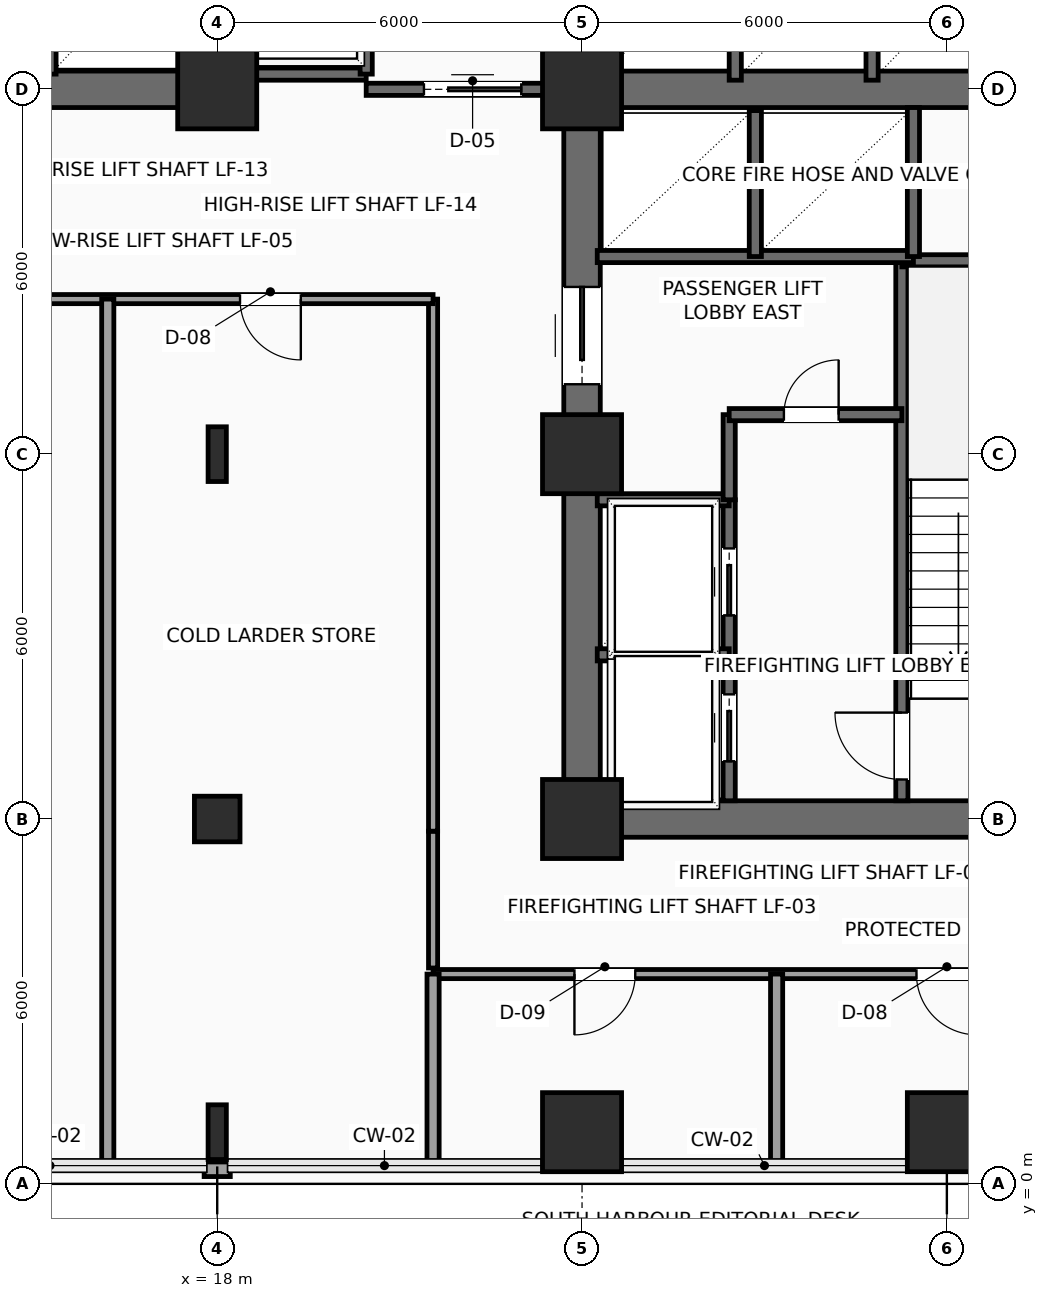
"""IFC4 building model, lengths in metres.
Left out: names, types, materials, properties, quantities, classifications, styles, units other than length and angle.
Written with IfcOpenShell. Run it as: python <this file> out.ifc"""

import sys

from ifc_helpers import new_model, si_unit, direction, frame, frame_2d, origin, origin_2d, place, context, subcontext, project, spatial, rectangle, hollow_rectangle, i_section, extrude, element, fill, save


model = new_model("IFC4")
c1 = context("Model", 3, precision=1e-05, world=origin(), true_north=direction((0.0, 1.0)))
c2 = subcontext(c1, "Body", "Model", "MODEL_VIEW")
j1 = project(units=[si_unit("LENGTHUNIT", "METRE"), si_unit("PLANEANGLEUNIT", "RADIAN")], contexts=[c1])
p1 = place(None, origin())
s1 = spatial("IfcSite", under=j1, at=p1, CompositionType="ELEMENT")
p2 = place(p1, origin())
s2 = spatial("IfcBuilding", under=s1, at=p2, CompositionType="ELEMENT")
p3 = place(p2, frame((0.0, 0.0, 71.4)))
s3 = spatial("IfcBuildingStorey", under=s2, at=p3, CompositionType="ELEMENT", Elevation=71.4)
for number, where, z_axis, x_axis in (
    (1, (18.0, 18.0, 0.0), (0.0, 0.0, 1.0), (1.0, 0.0, 0.0)),
    (2, (24.0, 6.0, 0.0), (0.0, 0.0, 1.0), (1.0, 0.0, 0.0)),
    (3, (24.0, 12.0, 0.0), (0.0, 0.0, 1.0), (1.0, 0.0, 0.0)),
    (4, (24.0, 18.0, 0.0), (0.0, 0.0, 1.0), (1.0, 0.0, 0.0)),
):
    element("IfcColumn", number, at=place(p3, frame(where, z_axis=z_axis, x_axis=x_axis)), inside=s3, PredefinedType="COLUMN", context=c2, shape_type="SweptSolid", body=[
        extrude(rectangle(XDim=1.3, YDim=1.3, at=origin_2d()), origin(), (0.0, 0.0, 1.0), 3.9),
    ])
p4 = place(p3, frame((18.0, 0.85, 0.0), z_axis=(0.0, 0.0, 1.0), x_axis=(1.0, 0.0, 0.0)))
e5 = element("IfcColumn", 5, at=p4, inside=s3, PredefinedType="COLUMN", context=c2, shape_type="SweptSolid", body=[
    extrude(i_section(OverallWidth=0.3, OverallDepth=0.9, WebThickness=0.019, FlangeThickness=0.035, FilletRadius=0.03, at=origin_2d()), origin(), (0.0, 0.0, 1.0), 3.9),
])
p5 = place(p3, frame((18.0, 6.0, 0.0), z_axis=(0.0, 0.0, 1.0), x_axis=(1.0, 0.0, 0.0)))
e6 = element("IfcColumn", 6, at=p5, inside=s3, PredefinedType="COLUMN", context=c2, shape_type="SweptSolid", body=[
    extrude(hollow_rectangle(XDim=0.75, YDim=0.75, WallThickness=0.035, InnerFilletRadius=0.035, OuterFilletRadius=0.05, at=origin_2d()), origin(), (0.0, 0.0, 1.0), 3.9),
])
p6 = place(p3, frame((18.0, 12.0, 0.0), z_axis=(0.0, 0.0, 1.0), x_axis=(1.0, 0.0, 0.0)))
e7 = element("IfcColumn", 7, at=p6, inside=s3, PredefinedType="COLUMN", context=c2, shape_type="SweptSolid", body=[
    extrude(i_section(OverallWidth=0.3, OverallDepth=0.9, WebThickness=0.019, FlangeThickness=0.035, FilletRadius=0.03, at=origin_2d()), origin(), (0.0, 0.0, 1.0), 3.9),
])
for number, where, z_axis, x_axis in (
    (8, (24.0, 0.85, 0.0), (0.0, 0.0, 1.0), (1.0, 0.0, 0.0)),
    (9, (30.0, 0.85, 0.0), (0.0, 0.0, 1.0), (1.0, 0.0, 0.0)),
):
    element("IfcColumn", number, at=place(p3, frame(where, z_axis=z_axis, x_axis=x_axis)), inside=s3, PredefinedType="COLUMN", context=c2, shape_type="SweptSolid", body=[
        extrude(rectangle(XDim=1.3, YDim=1.3, at=origin_2d()), origin(), (0.0, 0.0, 1.0), 3.9),
    ])
p7 = place(p3, frame((18.215, 0.24, 0.0), z_axis=(0.0, 0.0, 1.0), x_axis=(-1.0, 0.0, 0.0)))
e10 = element("IfcWall", 10, at=p7, inside=s3, PredefinedType="SOLIDWALL", context=c2, shape_type="SweptSolid", body=[
    extrude(rectangle(XDim=0.43, YDim=0.24, at=frame_2d((0.215, 0.0))), origin(), (0.0, 0.0, 1.0), 3.65),
])
p8 = place(p3, frame((6.0, 18.0, 0.0), z_axis=(0.0, 0.0, 1.0), x_axis=(1.0, 0.0, 0.0)))
e11 = element("IfcWall", 11, at=p8, inside=s3, PredefinedType="SHEAR", context=c2, shape_type="SweptSolid", body=[
    extrude(rectangle(XDim=12.0, YDim=0.6, at=frame_2d((6.0, 0.0))), origin(), (0.0, 0.0, 1.0), 3.65),
])
p9 = place(p8, frame((7.15, 0.0, 0.0)))
e12 = element("IfcOpeningElement", 12, at=p9, cuts=e11, PredefinedType="OPENING", context=c2, shape_type="SweptSolid", body=[
    extrude(rectangle(XDim=1.6, YDim=2.3, at=frame_2d((0.8, 1.15))), frame((0.0, 0.31, 0.0), z_axis=(0.0, -1.0, 0.0), x_axis=(1.0, 0.0, 0.0)), (0.0, 0.0, 1.0), 0.62),
])
for number, where, z_axis, x_axis in (
    (13, (18.0, 18.0, 0.0), (0.0, 0.0, 1.0), (0.0, 1.0, 0.0)),
    (14, (24.0, 6.0, 0.0), (0.0, 0.0, 1.0), (1.0, 0.0, 0.0)),
    (15, (24.0, 18.0, 0.0), (0.0, 0.0, 1.0), (1.0, 0.0, 0.0)),
):
    element("IfcWall", number, at=place(p3, frame(where, z_axis=z_axis, x_axis=x_axis)), inside=s3, PredefinedType="SHEAR", context=c2, shape_type="SweptSolid", body=[
        extrude(rectangle(XDim=9.6, YDim=0.6, at=frame_2d((4.8, 0.0))), origin(), (0.0, 0.0, 1.0), 3.65),
    ])
p10 = place(p3, frame((24.0, 6.0, 0.0), z_axis=(0.0, 0.0, 1.0), x_axis=(0.0, 1.0, 0.0)))
e16 = element("IfcWall", 16, at=p10, inside=s3, PredefinedType="SHEAR", context=c2, shape_type="SweptSolid", body=[
    extrude(rectangle(XDim=12.0, YDim=0.6, at=frame_2d((6.0, 0.0))), origin(), (0.0, 0.0, 1.0), 3.65),
])
p11 = place(p10, frame((7.15, 0.0, 0.0)))
e17 = element("IfcOpeningElement", 17, at=p11, cuts=e16, PredefinedType="OPENING", context=c2, shape_type="SweptSolid", body=[
    extrude(rectangle(XDim=1.6, YDim=2.3, at=frame_2d((0.8, 1.15))), frame((0.0, 0.31, 0.0), z_axis=(0.0, -1.0, 0.0), x_axis=(1.0, 0.0, 0.0)), (0.0, 0.0, 1.0), 0.62),
])
p12 = place(p3, frame((29.26, 6.3, 0.0), z_axis=(0.0, 0.0, 1.0), x_axis=(0.0, 1.0, 0.0)))
e18 = element("IfcWall", 18, at=p12, inside=s3, PredefinedType="SHEAR", context=c2, shape_type="SweptSolid", body=[
    extrude(rectangle(XDim=8.88, YDim=0.2, at=frame_2d((4.44, 0.0))), origin(), (0.0, 0.0, 1.0), 3.65),
])
p13 = place(p12, frame((0.35, 0.0, 0.0)))
e19 = element("IfcOpeningElement", 19, at=p13, cuts=e18, PredefinedType="OPENING", context=c2, shape_type="SweptSolid", body=[
    extrude(rectangle(XDim=1.1, YDim=2.2, at=frame_2d((0.55, 1.1))), frame((0.0, 0.11, 0.0), z_axis=(0.0, -1.0, 0.0), x_axis=(1.0, 0.0, 0.0)), (0.0, 0.0, 1.0), 0.22),
])
p14 = place(p3, frame((29.26, 15.18, 0.0), z_axis=(0.0, 0.0, 1.0), x_axis=(1.0, 0.0, 0.0)))
e20 = element("IfcWall", 20, at=p14, inside=s3, PredefinedType="SHEAR", context=c2, shape_type="SweptSolid", body=[
    extrude(rectangle(XDim=4.04, YDim=0.2, at=frame_2d((2.02, 0.0))), origin(), (0.0, 0.0, 1.0), 3.65),
])
p15 = place(p3, frame((26.42, 6.3, 0.0), z_axis=(0.0, 0.0, 1.0), x_axis=(0.0, 1.0, 0.0)))
e21 = element("IfcWall", 21, at=p15, inside=s3, PredefinedType="SHEAR", context=c2, shape_type="SweptSolid", body=[
    extrude(rectangle(XDim=4.95, YDim=0.2, at=frame_2d((2.475, 0.0))), origin(), (0.0, 0.0, 1.0), 3.65),
])
p16 = place(p15, frame((0.65, 0.0, 0.0)))
e22 = element("IfcOpeningElement", 22, at=p16, cuts=e21, PredefinedType="OPENING", context=c2, shape_type="SweptSolid", body=[
    extrude(rectangle(XDim=1.1, YDim=2.2, at=frame_2d((0.55, 1.1))), frame((0.0, 0.11, 0.0), z_axis=(0.0, -1.0, 0.0), x_axis=(1.0, 0.0, 0.0)), (0.0, 0.0, 1.0), 0.22),
])
p17 = place(p15, frame((3.05, 0.0, 0.0)))
e23 = element("IfcOpeningElement", 23, at=p17, cuts=e21, PredefinedType="OPENING", context=c2, shape_type="SweptSolid", body=[
    extrude(rectangle(XDim=1.1, YDim=2.2, at=frame_2d((0.55, 1.1))), frame((0.0, 0.11, 0.0), z_axis=(0.0, -1.0, 0.0), x_axis=(1.0, 0.0, 0.0)), (0.0, 0.0, 1.0), 0.22),
])
for number, where, z_axis, x_axis in (
    (24, (24.25, 8.7, 0.0), (0.0, 0.0, 1.0), (1.0, 0.0, 0.0)),
    (25, (24.25, 11.25, 0.0), (0.0, 0.0, 1.0), (1.0, 0.0, 0.0)),
):
    element("IfcWall", number, at=place(p3, frame(where, z_axis=z_axis, x_axis=x_axis)), inside=s3, PredefinedType="SHEAR", context=c2, shape_type="SweptSolid", body=[
        extrude(rectangle(XDim=2.17, YDim=0.2, at=frame_2d((1.085, 0.0))), origin(), (0.0, 0.0, 1.0), 3.65),
    ])
p18 = place(p3, frame((26.42, 11.25, 0.0), z_axis=(0.0, 0.0, 1.0), x_axis=(0.0, 1.0, 0.0)))
e26 = element("IfcWall", 26, at=p18, inside=s3, PredefinedType="SHEAR", context=c2, shape_type="SweptSolid", body=[
    extrude(rectangle(XDim=1.4, YDim=0.2, at=frame_2d((0.7, 0.0))), origin(), (0.0, 0.0, 1.0), 3.65),
])
p19 = place(p3, frame((26.42, 12.65, 0.0), z_axis=(0.0, 0.0, 1.0), x_axis=(1.0, 0.0, 0.0)))
e27 = element("IfcWall", 27, at=p19, inside=s3, PredefinedType="SHEAR", context=c2, shape_type="SweptSolid", body=[
    extrude(rectangle(XDim=2.84, YDim=0.2, at=frame_2d((1.42, 0.0))), origin(), (0.0, 0.0, 1.0), 3.65),
])
p20 = place(p19, frame((0.9, 0.0, 0.0)))
e28 = element("IfcOpeningElement", 28, at=p20, cuts=e27, PredefinedType="OPENING", context=c2, shape_type="SweptSolid", body=[
    extrude(rectangle(XDim=0.9, YDim=2.15, at=frame_2d((0.45, 1.075))), frame((0.0, 0.11, 0.0), z_axis=(0.0, -1.0, 0.0), x_axis=(1.0, 0.0, 0.0)), (0.0, 0.0, 1.0), 0.22),
])
for number, where, z_axis, x_axis in (
    (29, (15.25, 18.25, 0.0), (0.0, 0.0, 1.0), (0.0, 1.0, 0.0)),
    (30, (24.25, 15.25, 0.0), (0.0, 0.0, 1.0), (1.0, 0.0, 0.0)),
):
    element("IfcWall", number, at=place(p3, frame(where, z_axis=z_axis, x_axis=x_axis)), inside=s3, PredefinedType="SHEAR", context=c2, shape_type="SweptSolid", body=[
        extrude(rectangle(XDim=5.2, YDim=0.2, at=frame_2d((2.6, 0.0))), origin(), (0.0, 0.0, 1.0), 3.65),
    ])
p21 = place(p3, frame((26.85, 15.25, 0.0), z_axis=(0.0, 0.0, 1.0), x_axis=(0.0, 1.0, 0.0)))
e31 = element("IfcWall", 31, at=p21, inside=s3, PredefinedType="SHEAR", context=c2, shape_type="SweptSolid", body=[
    extrude(rectangle(XDim=2.4, YDim=0.2, at=frame_2d((1.2, 0.0))), origin(), (0.0, 0.0, 1.0), 3.65),
])
p22 = place(p3, frame((29.45, 15.25, 0.0), z_axis=(0.0, 0.0, 1.0), x_axis=(0.0, 1.0, 0.0)))
e32 = element("IfcWall", 32, at=p22, inside=s3, PredefinedType="SHEAR", context=c2, shape_type="SweptSolid", body=[
    extrude(rectangle(XDim=2.45, YDim=0.2, at=frame_2d((1.225, 0.0))), origin(), (0.0, 0.0, 1.0), 3.65),
])
p23 = place(p3, frame((18.1, 18.25, 0.0), z_axis=(0.0, 0.0, 1.0), x_axis=(1.0, 0.0, 0.0)))
e33 = element("IfcWall", 33, at=p23, inside=s3, PredefinedType="SHEAR", context=c2, shape_type="SweptSolid", body=[
    extrude(rectangle(XDim=2.35, YDim=0.2, at=frame_2d((1.175, 0.0))), origin(), (0.0, 0.0, 1.0), 3.65),
])
p24 = place(p3, frame((20.45, 18.25, 0.0), z_axis=(0.0, 0.0, 1.0), x_axis=(0.0, 1.0, 0.0)))
e34 = element("IfcWall", 34, at=p24, inside=s3, PredefinedType="SHEAR", context=c2, shape_type="SweptSolid", body=[
    extrude(rectangle(XDim=9.05, YDim=0.2, at=frame_2d((4.525, 0.0))), origin(), (0.0, 0.0, 1.0), 3.65),
])
p25 = place(p24, frame((0.4, 0.0, 0.0)))
e35 = element("IfcOpeningElement", 35, at=p25, cuts=e34, PredefinedType="OPENING", context=c2, shape_type="SweptSolid", body=[
    extrude(rectangle(XDim=1.2, YDim=2.2, at=frame_2d((0.6, 1.1))), frame((0.0, 0.11, 0.0), z_axis=(0.0, -1.0, 0.0), x_axis=(1.0, 0.0, 0.0)), (0.0, 0.0, 1.0), 0.22),
])
p26 = place(p24, frame((2.65, 0.0, 0.0)))
e36 = element("IfcOpeningElement", 36, at=p26, cuts=e34, PredefinedType="OPENING", context=c2, shape_type="SweptSolid", body=[
    extrude(rectangle(XDim=1.2, YDim=2.2, at=frame_2d((0.6, 1.1))), frame((0.0, 0.11, 0.0), z_axis=(0.0, -1.0, 0.0), x_axis=(1.0, 0.0, 0.0)), (0.0, 0.0, 1.0), 0.22),
])
p27 = place(p24, frame((4.9, 0.0, 0.0)))
e37 = element("IfcOpeningElement", 37, at=p27, cuts=e34, PredefinedType="OPENING", context=c2, shape_type="SweptSolid", body=[
    extrude(rectangle(XDim=1.2, YDim=2.2, at=frame_2d((0.6, 1.1))), frame((0.0, 0.11, 0.0), z_axis=(0.0, -1.0, 0.0), x_axis=(1.0, 0.0, 0.0)), (0.0, 0.0, 1.0), 0.22),
])
p28 = place(p24, frame((7.15, 0.0, 0.0)))
e38 = element("IfcOpeningElement", 38, at=p28, cuts=e34, PredefinedType="OPENING", context=c2, shape_type="SweptSolid", body=[
    extrude(rectangle(XDim=1.2, YDim=2.2, at=frame_2d((0.6, 1.1))), frame((0.0, 0.11, 0.0), z_axis=(0.0, -1.0, 0.0), x_axis=(1.0, 0.0, 0.0)), (0.0, 0.0, 1.0), 0.22),
])
p29 = place(p3, frame((20.45, 18.0, 0.0), z_axis=(0.0, 0.0, 1.0), x_axis=(1.0, 0.0, 0.0)))
e39 = element("IfcWall", 39, at=p29, inside=s3, PredefinedType="SHEAR", context=c2, shape_type="SweptSolid", body=[
    extrude(rectangle(XDim=3.5, YDim=0.2, at=frame_2d((1.75, 0.0))), origin(), (0.0, 0.0, 1.0), 3.65),
])
p30 = place(p29, frame((0.95, 0.0, 0.0)))
e40 = element("IfcOpeningElement", 40, at=p30, cuts=e39, PredefinedType="OPENING", context=c2, shape_type="SweptSolid", body=[
    extrude(rectangle(XDim=1.6, YDim=2.3, at=frame_2d((0.8, 1.15))), frame((0.0, 0.11, 0.0), z_axis=(0.0, -1.0, 0.0), x_axis=(1.0, 0.0, 0.0)), (0.0, 0.0, 1.0), 0.22),
])
p31 = place(p3, frame((23.95, 18.0, 0.0), z_axis=(0.0, 0.0, 1.0), x_axis=(0.0, 1.0, 0.0)))
e41 = element("IfcWall", 41, at=p31, inside=s3, PredefinedType="SHEAR", context=c2, shape_type="SweptSolid", body=[
    extrude(rectangle(XDim=9.3, YDim=0.2, at=frame_2d((4.65, 0.0))), origin(), (0.0, 0.0, 1.0), 3.65),
])
p32 = place(p3, frame((24.25, 18.1, 0.0), z_axis=(0.0, 0.0, 1.0), x_axis=(0.0, 1.0, 0.0)))
e42 = element("IfcWall", 42, at=p32, inside=s3, PredefinedType="SHEAR", context=c2, shape_type="SweptSolid", body=[
    extrude(rectangle(XDim=2.35, YDim=0.2, at=frame_2d((1.175, 0.0))), origin(), (0.0, 0.0, 1.0), 3.65),
])
for number, where, z_axis, x_axis in (
    (43, (26.52, 18.15, 0.0), (0.0, 0.0, 1.0), (0.0, 1.0, 0.0)),
    (44, (28.77, 18.15, 0.0), (0.0, 0.0, 1.0), (0.0, 1.0, 0.0)),
):
    element("IfcWall", number, at=place(p3, frame(where, z_axis=z_axis, x_axis=x_axis)), inside=s3, PredefinedType="SHEAR", context=c2, shape_type="SweptSolid", body=[
        extrude(rectangle(XDim=2.3, YDim=0.2, at=frame_2d((1.15, 0.0))), origin(), (0.0, 0.0, 1.0), 3.65),
    ])
p33 = place(p3, frame((36.15, 3.45, 0.0), z_axis=(0.0, 0.0, 1.0), x_axis=(-1.0, 0.0, 0.0)))
e45 = element("IfcWall", 45, at=p33, inside=s3, PredefinedType="PARTITIONING", context=c2, shape_type="SweptSolid", body=[
    extrude(rectangle(XDim=14.6, YDim=0.15, at=frame_2d((7.3, 0.0))), origin(), (0.0, 0.0, 1.0), 3.142),
])
p34 = place(p33, frame((11.275, 0.0, 0.0)))
e46 = element("IfcOpeningElement", 46, at=p34, cuts=e45, PredefinedType="OPENING", context=c2, shape_type="SweptSolid", body=[
    extrude(rectangle(XDim=1.0, YDim=2.2, at=frame_2d((0.5, 1.1))), frame((0.0, 0.085, 0.0), z_axis=(0.0, -1.0, 0.0), x_axis=(1.0, 0.0, 0.0)), (0.0, 0.0, 1.0), 0.17),
])
p35 = place(p33, frame((5.65, 0.0, 0.0)))
e47 = element("IfcOpeningElement", 47, at=p35, cuts=e45, PredefinedType="OPENING", context=c2, shape_type="SweptSolid", body=[
    extrude(rectangle(XDim=1.0, YDim=2.2, at=frame_2d((0.5, 1.1))), frame((0.0, 0.085, 0.0), z_axis=(0.0, -1.0, 0.0), x_axis=(1.0, 0.0, 0.0)), (0.0, 0.0, 1.0), 0.17),
])
p36 = place(p3, frame((21.55, 3.55, 0.0), z_axis=(0.0, 0.0, 1.0), x_axis=(0.0, 1.0, 0.0)))
e48 = element("IfcWall", 48, at=p36, inside=s3, PredefinedType="PARTITIONING", context=c2, shape_type="SweptSolid", body=[
    extrude(rectangle(XDim=2.25, YDim=0.15, at=frame_2d((1.125, 0.0))), origin(), (0.0, 0.0, 1.0), 3.65),
])
p37 = place(p3, frame((21.55, 5.8, 0.0), z_axis=(0.0, 0.0, 1.0), x_axis=(0.0, 1.0, 0.0)))
e49 = element("IfcWall", 49, at=p37, inside=s3, PredefinedType="PARTITIONING", context=c2, shape_type="SweptSolid", body=[
    extrude(rectangle(XDim=8.75, YDim=0.15, at=frame_2d((4.375, 0.0))), origin(), (0.0, 0.0, 1.0), 3.65),
])
p38 = place(p3, frame((21.55, 14.55, 0.0), z_axis=(0.0, 0.0, 1.0), x_axis=(-1.0, 0.0, 0.0)))
e50 = element("IfcWall", 50, at=p38, inside=s3, PredefinedType="PARTITIONING", context=c2, shape_type="SweptSolid", body=[
    extrude(rectangle(XDim=8.95, YDim=0.15, at=frame_2d((4.475, 0.0))), origin(), (0.0, 0.0, 1.0), 3.65),
])
p39 = place(p38, frame((6.65, 0.0, 0.0)))
e51 = element("IfcOpeningElement", 51, at=p39, cuts=e50, PredefinedType="OPENING", context=c2, shape_type="SweptSolid", body=[
    extrude(rectangle(XDim=1.0, YDim=2.2, at=frame_2d((0.5, 1.1))), frame((0.0, 0.085, 0.0), z_axis=(0.0, -1.0, 0.0), x_axis=(1.0, 0.0, 0.0)), (0.0, 0.0, 1.0), 0.17),
])
p40 = place(p38, frame((2.175, 0.0, 0.0)))
e52 = element("IfcOpeningElement", 52, at=p40, cuts=e50, PredefinedType="OPENING", context=c2, shape_type="SweptSolid", body=[
    extrude(rectangle(XDim=1.0, YDim=2.2, at=frame_2d((0.5, 1.1))), frame((0.0, 0.085, 0.0), z_axis=(0.0, -1.0, 0.0), x_axis=(1.0, 0.0, 0.0)), (0.0, 0.0, 1.0), 0.17),
])
p41 = place(p3, frame((16.2, 0.3, 0.0), z_axis=(0.0, 0.0, 1.0), x_axis=(0.0, 1.0, 0.0)))
e53 = element("IfcWall", 53, at=p41, inside=s3, PredefinedType="PARTITIONING", context=c2, shape_type="SweptSolid", body=[
    extrude(rectangle(XDim=14.25, YDim=0.2, at=frame_2d((7.125, 0.0))), origin(), (0.0, 0.0, 1.0), 3.65),
])
for number, where, z_axis, x_axis in (
    (54, (21.55, 0.3, 0.0), (0.0, 0.0, 1.0), (0.0, 1.0, 0.0)),
    (55, (27.2, 0.3, 0.0), (0.0, 0.0, 1.0), (0.0, 1.0, 0.0)),
):
    element("IfcWall", number, at=place(p3, frame(where, z_axis=z_axis, x_axis=x_axis)), inside=s3, PredefinedType="PARTITIONING", context=c2, shape_type="SweptSolid", body=[
        extrude(rectangle(XDim=3.15, YDim=0.2, at=frame_2d((1.575, 0.0))), origin(), (0.0, 0.0, 1.0), 3.65),
    ])
p42 = place(p11, origin())
e56 = element("IfcDoor", 56, at=p42, inside=s3, OperationType="DOUBLE_DOOR_SLIDING", PredefinedType="DOOR", context=c2, shape_type="SweptSolid", body=[
    extrude(rectangle(XDim=1.6, YDim=2.3, at=frame_2d((0.8, 1.15))), frame((0.0, 0.025, 0.0), z_axis=(0.0, -1.0, 0.0), x_axis=(1.0, 0.0, 0.0)), (0.0, 0.0, 1.0), 0.05),
])
fill(e17, e56)
p43 = place(p13, origin())
e57 = element("IfcDoor", 57, at=p43, inside=s3, OperationType="SINGLE_SWING_RIGHT", PredefinedType="DOOR", context=c2, shape_type="SweptSolid", body=[
    extrude(rectangle(XDim=1.1, YDim=2.2, at=frame_2d((0.55, 1.1))), frame((0.0, 0.025, 0.0), z_axis=(0.0, -1.0, 0.0), x_axis=(1.0, 0.0, 0.0)), (0.0, 0.0, 1.0), 0.05),
])
fill(e19, e57)
p44 = place(p16, origin())
e58 = element("IfcDoor", 58, at=p44, inside=s3, OperationType="SLIDING_TO_LEFT", PredefinedType="DOOR", context=c2, shape_type="SweptSolid", body=[
    extrude(rectangle(XDim=1.1, YDim=2.2, at=frame_2d((0.55, 1.1))), frame((0.0, 0.025, 0.0), z_axis=(0.0, -1.0, 0.0), x_axis=(1.0, 0.0, 0.0)), (0.0, 0.0, 1.0), 0.05),
])
fill(e22, e58)
p45 = place(p17, origin())
e59 = element("IfcDoor", 59, at=p45, inside=s3, OperationType="SLIDING_TO_LEFT", PredefinedType="DOOR", context=c2, shape_type="SweptSolid", body=[
    extrude(rectangle(XDim=1.1, YDim=2.2, at=frame_2d((0.55, 1.1))), frame((0.0, 0.025, 0.0), z_axis=(0.0, -1.0, 0.0), x_axis=(1.0, 0.0, 0.0)), (0.0, 0.0, 1.0), 0.05),
])
fill(e23, e59)
p46 = place(p20, origin())
e60 = element("IfcDoor", 60, at=p46, inside=s3, OperationType="SINGLE_SWING_RIGHT", PredefinedType="DOOR", context=c2, shape_type="SweptSolid", body=[
    extrude(rectangle(XDim=0.9, YDim=2.15, at=frame_2d((0.45, 1.075))), frame((0.0, 0.025, 0.0), z_axis=(0.0, -1.0, 0.0), x_axis=(1.0, 0.0, 0.0)), (0.0, 0.0, 1.0), 0.05),
])
fill(e28, e60)
p47 = place(p30, origin())
e61 = element("IfcDoor", 61, at=p47, inside=s3, OperationType="DOUBLE_DOOR_SLIDING", PredefinedType="DOOR", context=c2, shape_type="SweptSolid", body=[
    extrude(rectangle(XDim=1.6, YDim=2.3, at=frame_2d((0.8, 1.15))), frame((0.0, 0.025, 0.0), z_axis=(0.0, -1.0, 0.0), x_axis=(1.0, 0.0, 0.0)), (0.0, 0.0, 1.0), 0.05),
])
fill(e40, e61)
p48 = place(p34, origin())
e62 = element("IfcDoor", 62, at=p48, inside=s3, OperationType="SINGLE_SWING_RIGHT", PredefinedType="DOOR", context=c2, shape_type="SweptSolid", body=[
    extrude(rectangle(XDim=1.0, YDim=2.2, at=frame_2d((0.5, 1.1))), frame((0.0, 0.025, 0.0), z_axis=(0.0, -1.0, 0.0), x_axis=(1.0, 0.0, 0.0)), (0.0, 0.0, 1.0), 0.05),
])
fill(e46, e62)
p49 = place(p35, origin())
e63 = element("IfcDoor", 63, at=p49, inside=s3, OperationType="SINGLE_SWING_LEFT", PredefinedType="DOOR", context=c2, shape_type="SweptSolid", body=[
    extrude(rectangle(XDim=1.0, YDim=2.2, at=frame_2d((0.5, 1.1))), frame((0.0, 0.025, 0.0), z_axis=(0.0, -1.0, 0.0), x_axis=(1.0, 0.0, 0.0)), (0.0, 0.0, 1.0), 0.05),
])
fill(e47, e63)
p50 = place(p40, origin())
e64 = element("IfcDoor", 64, at=p50, inside=s3, OperationType="SINGLE_SWING_LEFT", PredefinedType="DOOR", context=c2, shape_type="SweptSolid", body=[
    extrude(rectangle(XDim=1.0, YDim=2.2, at=frame_2d((0.5, 1.1))), frame((0.0, 0.025, 0.0), z_axis=(0.0, -1.0, 0.0), x_axis=(1.0, 0.0, 0.0)), (0.0, 0.0, 1.0), 0.05),
])
fill(e52, e64)
save(model, sys.argv[1])
